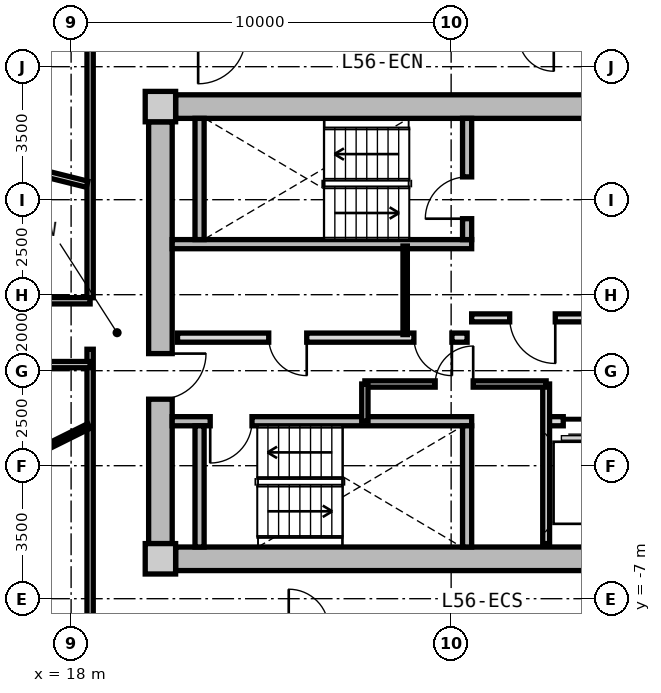
"""IFC4 building model, lengths in metres.
Left out: names, types, materials, properties, quantities, classifications, styles, units other than length and angle.
Written with IfcOpenShell. Run it as: python <this file> out.ifc"""

import sys

from ifc_helpers import new_model, si_unit, direction, frame, frame_2d, origin, origin_2d, place, context, subcontext, project, spatial, rectangle, extrude, source, transform, mapped, element, fill, save


model = new_model("IFC4")
c1 = context("Model", 3, precision=1e-05, world=origin(), true_north=direction((0.0, 1.0)))
c2 = subcontext(c1, "Body", "Model", "MODEL_VIEW")
j1 = project(units=[si_unit("LENGTHUNIT", "METRE"), si_unit("PLANEANGLEUNIT", "RADIAN")], contexts=[c1])
p1 = place(None, origin())
s1 = spatial("IfcSite", under=j1, at=p1, CompositionType="ELEMENT")
p2 = place(p1, origin())
s2 = spatial("IfcBuilding", under=s1, at=p2, CompositionType="ELEMENT")
p3 = place(p2, frame((0.0, 0.0, 180.05)))
s3 = spatial("IfcBuildingStorey", under=s2, at=p3, CompositionType="ELEMENT", Elevation=180.05)
m1 = source(origin(), c2, "Body", "SweptSolid", [
    extrude(rectangle(XDim=0.8, YDim=0.8, at=origin_2d()), origin(), (0.0, 0.0, 1.0), 3.05),
])
for number, where, z_axis, x_axis in (
    (1, (20.35, -5.95, 0.0), (0.0, 0.0, 1.0), (1.0, 0.0, 0.0)),
    (2, (20.35, 5.95, 0.0), (0.0, 0.0, 1.0), (1.0, 0.0, 0.0)),
):
    element("IfcColumn", number, at=place(p3, frame(where, z_axis=z_axis, x_axis=x_axis)), inside=s3, PredefinedType="COLUMN", context=c2, shape_type="MappedRepresentation", body=[
        mapped(m1, transform((0.0, 0.0, 0.0), x_axis=(1.0, 0.0, 0.0), y_axis=(0.0, 1.0, 0.0), z_axis=(0.0, 0.0, 1.0), scale=1.0)),
    ])
m2 = source(origin(), c2, "Body", "SweptSolid", [
    extrude(rectangle(XDim=14.5, YDim=0.62, at=frame_2d((7.25, 0.0))), origin(), (0.0, 0.0, 1.0), 2.81),
])
for number, where, z_axis, x_axis in (
    (3, (20.75, 5.95, 0.0), (0.0, 0.0, 1.0), (1.0, 0.0, 0.0)),
    (4, (35.25, -5.95, 0.0), (0.0, 0.0, 1.0), (-1.0, 0.0, 0.0)),
):
    element("IfcWall", number, at=place(p3, frame(where, z_axis=z_axis, x_axis=x_axis)), inside=s3, PredefinedType="SHEAR", context=c2, shape_type="MappedRepresentation", body=[
        mapped(m2, transform((0.0, 0.0, 0.0), x_axis=(1.0, 0.0, 0.0), y_axis=(0.0, 1.0, 0.0), z_axis=(0.0, 0.0, 1.0), scale=1.0)),
    ])
m3 = source(origin(), c2, "Body", "SweptSolid", [
    extrude(rectangle(XDim=11.1, YDim=0.62, at=frame_2d((5.55, 0.0))), origin(), (0.0, 0.0, 1.0), 2.81),
])
p4 = place(p3, frame((20.35, -5.55, 0.0), z_axis=(0.0, 0.0, 1.0), x_axis=(0.0, 1.0, 0.0)))
e5 = element("IfcWall", 5, at=p4, inside=s3, PredefinedType="SHEAR", context=c2, shape_type="MappedRepresentation", body=[
    mapped(m3, transform((0.0, 0.0, 0.0), x_axis=(1.0, 0.0, 0.0), y_axis=(0.0, 1.0, 0.0), z_axis=(0.0, 0.0, 1.0), scale=1.0)),
])
p5 = place(p4, frame((3.8, 0.0, 0.0)))
e6 = element("IfcOpeningElement", 6, at=p5, cuts=e5, PredefinedType="OPENING", context=c2, shape_type="SweptSolid", body=[
    extrude(rectangle(XDim=1.2, YDim=2.15, at=frame_2d((0.6, 1.075))), frame((0.0, 0.32, 0.0), z_axis=(0.0, -1.0, 0.0), x_axis=(1.0, 0.0, 0.0)), (0.0, 0.0, 1.0), 0.64),
])
m4 = source(origin(), c2, "Body", "SweptSolid", [
    extrude(rectangle(XDim=7.88, YDim=0.24, at=frame_2d((3.94, 0.0))), origin(), (0.0, 0.0, 1.0), 2.81),
])
p6 = place(p3, frame((20.66, 2.33, 0.0), z_axis=(0.0, 0.0, 1.0), x_axis=(1.0, 0.0, 0.0)))
e7 = element("IfcWall", 7, at=p6, inside=s3, PredefinedType="PARTITIONING", context=c2, shape_type="MappedRepresentation", body=[
    mapped(m4, transform((0.0, 0.0, 0.0), x_axis=(1.0, 0.0, 0.0), y_axis=(0.0, 1.0, 0.0), z_axis=(0.0, 0.0, 1.0), scale=1.0)),
])
m5 = source(origin(), c2, "Body", "SweptSolid", [
    extrude(rectangle(XDim=3.19, YDim=0.24, at=frame_2d((1.595, 0.0))), origin(), (0.0, 0.0, 1.0), 2.81),
])
p7 = place(p3, frame((21.38, 2.45, 0.0), z_axis=(0.0, 0.0, 1.0), x_axis=(0.0, 1.0, 0.0)))
e8 = element("IfcWall", 8, at=p7, inside=s3, PredefinedType="PARTITIONING", context=c2, shape_type="MappedRepresentation", body=[
    mapped(m5, transform((0.0, 0.0, 0.0), x_axis=(1.0, 0.0, 0.0), y_axis=(0.0, 1.0, 0.0), z_axis=(0.0, 0.0, 1.0), scale=1.0)),
])
p8 = place(p3, frame((28.42, 2.45, 0.0), z_axis=(0.0, 0.0, 1.0), x_axis=(0.0, 1.0, 0.0)))
e9 = element("IfcWall", 9, at=p8, inside=s3, PredefinedType="PARTITIONING", context=c2, shape_type="MappedRepresentation", body=[
    mapped(m5, transform((0.0, 0.0, 0.0), x_axis=(1.0, 0.0, 0.0), y_axis=(0.0, 1.0, 0.0), z_axis=(0.0, 0.0, 1.0), scale=1.0)),
])
p9 = place(p8, frame((0.55, 0.0, 0.0)))
e10 = element("IfcOpeningElement", 10, at=p9, cuts=e9, PredefinedType="OPENING", context=c2, shape_type="SweptSolid", body=[
    extrude(rectangle(XDim=1.1, YDim=2.15, at=frame_2d((0.55, 1.075))), frame((0.0, 0.13, 0.0), z_axis=(0.0, -1.0, 0.0), x_axis=(1.0, 0.0, 0.0)), (0.0, 0.0, 1.0), 0.26),
])
p10 = place(p3, frame((20.66, -2.33, 0.0), z_axis=(0.0, 0.0, 1.0), x_axis=(1.0, 0.0, 0.0)))
e11 = element("IfcWall", 11, at=p10, inside=s3, PredefinedType="PARTITIONING", context=c2, shape_type="MappedRepresentation", body=[
    mapped(m4, transform((0.0, 0.0, 0.0), x_axis=(1.0, 0.0, 0.0), y_axis=(0.0, 1.0, 0.0), z_axis=(0.0, 0.0, 1.0), scale=1.0)),
])
p11 = place(p10, frame((1.0, 0.0, 0.0)))
e12 = element("IfcOpeningElement", 12, at=p11, cuts=e11, PredefinedType="OPENING", context=c2, shape_type="SweptSolid", body=[
    extrude(rectangle(XDim=1.1, YDim=2.15, at=frame_2d((0.55, 1.075))), frame((0.0, 0.13, 0.0), z_axis=(0.0, -1.0, 0.0), x_axis=(1.0, 0.0, 0.0)), (0.0, 0.0, 1.0), 0.26),
])
for number, where, z_axis, x_axis in (
    (13, (21.38, -5.64, 0.0), (0.0, 0.0, 1.0), (0.0, 1.0, 0.0)),
    (14, (28.42, -5.64, 0.0), (0.0, 0.0, 1.0), (0.0, 1.0, 0.0)),
):
    element("IfcWall", number, at=place(p3, frame(where, z_axis=z_axis, x_axis=x_axis)), inside=s3, PredefinedType="PARTITIONING", context=c2, shape_type="MappedRepresentation", body=[
        mapped(m5, transform((0.0, 0.0, 0.0), x_axis=(1.0, 0.0, 0.0), y_axis=(0.0, 1.0, 0.0), z_axis=(0.0, 0.0, 1.0), scale=1.0)),
    ])
m6 = source(origin(), c2, "Body", "SweptSolid", [
    extrude(rectangle(XDim=6.66, YDim=0.21, at=frame_2d((3.33, 0.0))), origin(), (0.0, 0.0, 1.0), 2.795),
])
p12 = place(p3, frame((28.54, 0.39, 0.0), z_axis=(0.0, 0.0, 1.0), x_axis=(1.0, 0.0, 0.0)))
e15 = element("IfcWall", 15, at=p12, inside=s3, PredefinedType="PARTITIONING", context=c2, shape_type="MappedRepresentation", body=[
    mapped(m6, transform((0.0, 0.0, 0.0), x_axis=(1.0, 0.0, 0.0), y_axis=(0.0, 1.0, 0.0), z_axis=(0.0, 0.0, 1.0), scale=1.0)),
])
p13 = place(p12, frame((1.0, 0.0, 0.0)))
e16 = element("IfcOpeningElement", 16, at=p13, cuts=e15, PredefinedType="OPENING", context=c2, shape_type="SweptSolid", body=[
    extrude(rectangle(XDim=1.2, YDim=2.15, at=frame_2d((0.6, 1.075))), frame((0.0, 0.115, 0.0), z_axis=(0.0, -1.0, 0.0), x_axis=(1.0, 0.0, 0.0)), (0.0, 0.0, 1.0), 0.23),
])
m7 = source(origin(), c2, "Body", "SweptSolid", [
    extrude(rectangle(XDim=7.62, YDim=0.24, at=frame_2d((3.81, 0.0))), origin(), (0.0, 0.0, 1.0), 2.795),
])
p14 = place(p3, frame((20.8, -0.13, 0.0), z_axis=(0.0, 0.0, 1.0), x_axis=(1.0, 0.0, 0.0)))
e17 = element("IfcWall", 17, at=p14, inside=s3, PredefinedType="PARTITIONING", context=c2, shape_type="MappedRepresentation", body=[
    mapped(m7, transform((0.0, 0.0, 0.0), x_axis=(1.0, 0.0, 0.0), y_axis=(0.0, 1.0, 0.0), z_axis=(0.0, 0.0, 1.0), scale=1.0)),
])
p15 = place(p14, frame((6.22, 0.0, 0.0)))
e18 = element("IfcOpeningElement", 18, at=p15, cuts=e17, PredefinedType="OPENING", context=c2, shape_type="SweptSolid", body=[
    extrude(rectangle(XDim=1.0, YDim=2.1, at=frame_2d((0.5, 1.05))), frame((0.0, 0.13, 0.0), z_axis=(0.0, -1.0, 0.0), x_axis=(1.0, 0.0, 0.0)), (0.0, 0.0, 1.0), 0.26),
])
p16 = place(p14, frame((2.4, 0.0, 0.0)))
e19 = element("IfcOpeningElement", 19, at=p16, cuts=e17, PredefinedType="OPENING", context=c2, shape_type="SweptSolid", body=[
    extrude(rectangle(XDim=1.0, YDim=2.1, at=frame_2d((0.5, 1.05))), frame((0.0, 0.13, 0.0), z_axis=(0.0, -1.0, 0.0), x_axis=(1.0, 0.0, 0.0)), (0.0, 0.0, 1.0), 0.26),
])
m8 = source(origin(), c2, "Body", "SweptSolid", [
    extrude(rectangle(XDim=2.33, YDim=0.115, at=frame_2d((1.165, 0.0))), origin(), (0.0, 0.0, 1.0), 2.795),
])
p17 = place(p3, frame((26.79, -0.05, 0.0), z_axis=(0.0, 0.0, 1.0), x_axis=(0.0, 1.0, 0.0)))
e20 = element("IfcWall", 20, at=p17, inside=s3, PredefinedType="PARTITIONING", context=c2, shape_type="MappedRepresentation", body=[
    mapped(m8, transform((0.0, 0.0, 0.0), x_axis=(1.0, 0.0, 0.0), y_axis=(0.0, 1.0, 0.0), z_axis=(0.0, 0.0, 1.0), scale=1.0)),
])
m9 = source(origin(), c2, "Body", "SweptSolid", [
    extrude(rectangle(XDim=2.05, YDim=0.24, at=frame_2d((1.025, 0.0))), origin(), (0.0, 0.0, 1.0), 2.795),
])
p18 = place(p3, frame((30.5, -2.33, 0.0), z_axis=(0.0, 0.0, 1.0), x_axis=(1.0, 0.0, 0.0)))
e21 = element("IfcWall", 21, at=p18, inside=s3, PredefinedType="PARTITIONING", context=c2, shape_type="MappedRepresentation", body=[
    mapped(m9, transform((0.0, 0.0, 0.0), x_axis=(1.0, 0.0, 0.0), y_axis=(0.0, 1.0, 0.0), z_axis=(0.0, 0.0, 1.0), scale=1.0)),
])
p19 = place(p18, frame((0.45, 0.0, 0.0)))
e22 = element("IfcOpeningElement", 22, at=p19, cuts=e21, PredefinedType="OPENING", context=c2, shape_type="SweptSolid", body=[
    extrude(rectangle(XDim=1.1, YDim=2.2, at=frame_2d((0.55, 1.1))), frame((0.0, 0.13, 0.0), z_axis=(0.0, -1.0, 0.0), x_axis=(1.0, 0.0, 0.0)), (0.0, 0.0, 1.0), 0.26),
])
m10 = source(origin(), c2, "Body", "SweptSolid", [
    extrude(rectangle(XDim=4.2, YDim=0.18, at=frame_2d((2.1, 0.0))), origin(), (0.0, 0.0, 1.0), 2.795),
])
p20 = place(p3, frame((30.5, -5.55, 0.0), z_axis=(0.0, 0.0, 1.0), x_axis=(0.0, 1.0, 0.0)))
e23 = element("IfcWall", 23, at=p20, inside=s3, PredefinedType="PARTITIONING", context=c2, shape_type="MappedRepresentation", body=[
    mapped(m10, transform((0.0, 0.0, 0.0), x_axis=(1.0, 0.0, 0.0), y_axis=(0.0, 1.0, 0.0), z_axis=(0.0, 0.0, 1.0), scale=1.0)),
])
m11 = source(origin(), c2, "Body", "SweptSolid", [
    extrude(rectangle(XDim=4.77, YDim=0.165, at=frame_2d((2.385, 0.0))), origin(), (0.0, 0.0, 1.0), 2.795),
])
p21 = place(p3, frame((25.73, -1.35, 0.0), z_axis=(0.0, 0.0, 1.0), x_axis=(1.0, 0.0, 0.0)))
e24 = element("IfcWall", 24, at=p21, inside=s3, PredefinedType="PARTITIONING", context=c2, shape_type="MappedRepresentation", body=[
    mapped(m11, transform((0.0, 0.0, 0.0), x_axis=(1.0, 0.0, 0.0), y_axis=(0.0, 1.0, 0.0), z_axis=(0.0, 0.0, 1.0), scale=1.0)),
])
p22 = place(p21, frame((1.85, 0.0, 0.0)))
e25 = element("IfcOpeningElement", 25, at=p22, cuts=e24, PredefinedType="OPENING", context=c2, shape_type="SweptSolid", body=[
    extrude(rectangle(XDim=1.0, YDim=2.1, at=frame_2d((0.5, 1.05))), frame((0.0, 0.093, 0.0), z_axis=(0.0, -1.0, 0.0), x_axis=(1.0, 0.0, 0.0)), (0.0, 0.0, 1.0), 0.185),
])
m12 = source(origin(), c2, "Body", "SweptSolid", [
    extrude(rectangle(XDim=0.98, YDim=0.165, at=frame_2d((0.49, 0.0))), origin(), (0.0, 0.0, 1.0), 2.795),
])
p23 = place(p3, frame((25.73, -2.33, 0.0), z_axis=(0.0, 0.0, 1.0), x_axis=(0.0, 1.0, 0.0)))
e26 = element("IfcWall", 26, at=p23, inside=s3, PredefinedType="PARTITIONING", context=c2, shape_type="MappedRepresentation", body=[
    mapped(m12, transform((0.0, 0.0, 0.0), x_axis=(1.0, 0.0, 0.0), y_axis=(0.0, 1.0, 0.0), z_axis=(0.0, 0.0, 1.0), scale=1.0)),
])
m13 = source(origin(), c2, "Body", "SweptSolid", [
    extrude(rectangle(XDim=7.365, YDim=0.165, at=frame_2d((3.682, 0.0))), origin(), (0.0, 0.0, 1.0), 2.795),
])
p24 = place(p3, frame((18.5, -7.8, 0.0), z_axis=(0.0, 0.0, 1.0), x_axis=(0.0, 1.0, 0.0)))
e27 = element("IfcWall", 27, at=p24, inside=s3, PredefinedType="PARTITIONING", context=c2, shape_type="MappedRepresentation", body=[
    mapped(m13, transform((0.0, 0.0, 0.0), x_axis=(1.0, 0.0, 0.0), y_axis=(0.0, 1.0, 0.0), z_axis=(0.0, 0.0, 1.0), scale=1.0)),
])
m14 = source(origin(), c2, "Body", "SweptSolid", [
    extrude(rectangle(XDim=6.88, YDim=0.165, at=frame_2d((3.44, 0.0))), origin(), (0.0, 0.0, 1.0), 2.795),
])
p25 = place(p3, frame((18.5, 0.92, 0.0), z_axis=(0.0, 0.0, 1.0), x_axis=(0.0, 1.0, 0.0)))
e28 = element("IfcWall", 28, at=p25, inside=s3, PredefinedType="PARTITIONING", context=c2, shape_type="MappedRepresentation", body=[
    mapped(m14, transform((0.0, 0.0, 0.0), x_axis=(1.0, 0.0, 0.0), y_axis=(0.0, 1.0, 0.0), z_axis=(0.0, 0.0, 1.0), scale=1.0)),
])
m15 = source(origin(), c2, "Body", "SweptSolid", [
    extrude(rectangle(XDim=8.305, YDim=0.165, at=frame_2d((4.153, 0.0))), origin(), (0.0, 0.0, 1.0), 2.345),
])
p26 = place(p3, frame((18.42, 3.908, 0.0), z_axis=(0.0, 0.0, 1.0), x_axis=(-0.970309994378, 0.241864662175, 0.0)))
e29 = element("IfcWall", 29, at=p26, inside=s3, PredefinedType="PARTITIONING", context=c2, shape_type="MappedRepresentation", body=[
    mapped(m15, transform((0.0, 0.0, 0.0), x_axis=(1.0, 0.0, 0.0), y_axis=(0.0, 1.0, 0.0), z_axis=(0.0, 0.0, 1.0), scale=1.0)),
])
m16 = source(origin(), c2, "Body", "SweptSolid", [
    extrude(rectangle(XDim=8.189, YDim=0.165, at=frame_2d((4.094, 0.0))), origin(), (0.0, 0.0, 1.0), 2.795),
])
p27 = place(p3, frame((10.311, 0.84, 0.0), z_axis=(0.0, 0.0, 1.0), x_axis=(1.0, 0.0, 0.0)))
e30 = element("IfcWall", 30, at=p27, inside=s3, PredefinedType="PARTITIONING", context=c2, shape_type="MappedRepresentation", body=[
    mapped(m16, transform((0.0, 0.0, 0.0), x_axis=(1.0, 0.0, 0.0), y_axis=(0.0, 1.0, 0.0), z_axis=(0.0, 0.0, 1.0), scale=1.0)),
])
p28 = place(p27, frame((3.619, 0.0, 0.0)))
e31 = element("IfcOpeningElement", 31, at=p28, cuts=e30, PredefinedType="OPENING", context=c2, shape_type="SweptSolid", body=[
    extrude(rectangle(XDim=0.95, YDim=2.1, at=frame_2d((0.475, 1.05))), frame((0.0, 0.093, 0.0), z_axis=(0.0, -1.0, 0.0), x_axis=(1.0, 0.0, 0.0)), (0.0, 0.0, 1.0), 0.185),
])
p29 = place(p3, frame((18.5, -0.84, 0.0), z_axis=(0.0, 0.0, 1.0), x_axis=(-1.0, 0.0, 0.0)))
e32 = element("IfcWall", 32, at=p29, inside=s3, PredefinedType="PARTITIONING", context=c2, shape_type="MappedRepresentation", body=[
    mapped(m16, transform((0.0, 0.0, 0.0), x_axis=(1.0, 0.0, 0.0), y_axis=(0.0, 1.0, 0.0), z_axis=(0.0, 0.0, 1.0), scale=1.0)),
])
m17 = source(origin(), c2, "Body", "SweptSolid", [
    extrude(rectangle(XDim=2.403, YDim=0.14, at=frame_2d((1.201, 0.0))), origin(), (0.0, 0.0, 1.0), 2.795),
])
p30 = place(p3, frame((18.47, -2.456, 0.0), z_axis=(0.0, 0.0, 1.0), x_axis=(-0.895339866084, -0.445383569748, 0.0)))
e33 = element("IfcWall", 33, at=p30, inside=s3, PredefinedType="PARTITIONING", context=c2, shape_type="MappedRepresentation", body=[
    mapped(m17, transform((0.0, 0.0, 0.0), x_axis=(1.0, 0.0, 0.0), y_axis=(0.0, 1.0, 0.0), z_axis=(0.0, 0.0, 1.0), scale=1.0)),
])
m18 = source(origin(), c2, "Body", "SweptSolid", [
    extrude(rectangle(XDim=1.1, YDim=2.15, at=frame_2d((0.55, 1.075))), frame((0.0, 0.025, 0.0), z_axis=(0.0, -1.0, 0.0), x_axis=(1.0, 0.0, 0.0)), (0.0, 0.0, 1.0), 0.05),
])
p31 = place(p9, origin())
e34 = element("IfcDoor", 34, at=p31, inside=s3, OperationType="SINGLE_SWING_LEFT", PredefinedType="DOOR", context=c2, shape_type="MappedRepresentation", body=[
    mapped(m18, transform((0.0, 0.0, 0.0), x_axis=(1.0, 0.0, 0.0), y_axis=(0.0, 1.0, 0.0), z_axis=(0.0, 0.0, 1.0), scale=1.0)),
])
fill(e10, e34)
p32 = place(p11, frame((1.1, 0.0, 0.0), z_axis=(0.0, 0.0, 1.0), x_axis=(-1.0, 0.0, 0.0)))
e35 = element("IfcDoor", 35, at=p32, inside=s3, OperationType="SINGLE_SWING_RIGHT", PredefinedType="DOOR", context=c2, shape_type="MappedRepresentation", body=[
    mapped(m18, transform((0.0, 0.0, 0.0), x_axis=(1.0, 0.0, 0.0), y_axis=(0.0, 1.0, 0.0), z_axis=(0.0, 0.0, 1.0), scale=1.0)),
])
fill(e12, e35)
m19 = source(origin(), c2, "Body", "SweptSolid", [
    extrude(rectangle(XDim=1.2, YDim=2.15, at=frame_2d((0.6, 1.075))), frame((0.0, 0.025, 0.0), z_axis=(0.0, -1.0, 0.0), x_axis=(1.0, 0.0, 0.0)), (0.0, 0.0, 1.0), 0.05),
])
p33 = place(p13, frame((1.2, 0.0, 0.0), z_axis=(0.0, 0.0, 1.0), x_axis=(-1.0, 0.0, 0.0)))
e36 = element("IfcDoor", 36, at=p33, inside=s3, OperationType="SINGLE_SWING_LEFT", PredefinedType="DOOR", context=c2, shape_type="MappedRepresentation", body=[
    mapped(m19, transform((0.0, 0.0, 0.0), x_axis=(1.0, 0.0, 0.0), y_axis=(0.0, 1.0, 0.0), z_axis=(0.0, 0.0, 1.0), scale=1.0)),
])
fill(e16, e36)
p34 = place(p5, frame((1.2, 0.0, 0.0), z_axis=(0.0, 0.0, 1.0), x_axis=(-1.0, 0.0, 0.0)))
e37 = element("IfcDoor", 37, at=p34, inside=s3, OperationType="SINGLE_SWING_LEFT", PredefinedType="DOOR", context=c2, shape_type="MappedRepresentation", body=[
    mapped(m19, transform((0.0, 0.0, 0.0), x_axis=(1.0, 0.0, 0.0), y_axis=(0.0, 1.0, 0.0), z_axis=(0.0, 0.0, 1.0), scale=1.0)),
])
fill(e6, e37)
m20 = source(origin(), c2, "Body", "SweptSolid", [
    extrude(rectangle(XDim=1.0, YDim=2.1, at=frame_2d((0.5, 1.05))), frame((0.0, 0.025, 0.0), z_axis=(0.0, -1.0, 0.0), x_axis=(1.0, 0.0, 0.0)), (0.0, 0.0, 1.0), 0.05),
])
p35 = place(p15, frame((1.0, 0.0, 0.0), z_axis=(0.0, 0.0, 1.0), x_axis=(-1.0, 0.0, 0.0)))
e38 = element("IfcDoor", 38, at=p35, inside=s3, OperationType="SINGLE_SWING_LEFT", PredefinedType="DOOR", context=c2, shape_type="MappedRepresentation", body=[
    mapped(m20, transform((0.0, 0.0, 0.0), x_axis=(1.0, 0.0, 0.0), y_axis=(0.0, 1.0, 0.0), z_axis=(0.0, 0.0, 1.0), scale=1.0)),
])
fill(e18, e38)
p36 = place(p16, frame((1.0, 0.0, 0.0), z_axis=(0.0, 0.0, 1.0), x_axis=(-1.0, 0.0, 0.0)))
e39 = element("IfcDoor", 39, at=p36, inside=s3, OperationType="SINGLE_SWING_LEFT", PredefinedType="DOOR", context=c2, shape_type="MappedRepresentation", body=[
    mapped(m20, transform((0.0, 0.0, 0.0), x_axis=(1.0, 0.0, 0.0), y_axis=(0.0, 1.0, 0.0), z_axis=(0.0, 0.0, 1.0), scale=1.0)),
])
fill(e19, e39)
m21 = source(origin(), c2, "Body", "SweptSolid", [
    extrude(rectangle(XDim=1.1, YDim=2.2, at=frame_2d((0.55, 1.1))), frame((0.0, 0.025, 0.0), z_axis=(0.0, -1.0, 0.0), x_axis=(1.0, 0.0, 0.0)), (0.0, 0.0, 1.0), 0.05),
])
p37 = place(p19, frame((1.1, 0.0, 0.0), z_axis=(0.0, 0.0, 1.0), x_axis=(-1.0, 0.0, 0.0)))
e40 = element("IfcDoor", 40, at=p37, inside=s3, OperationType="SLIDING_TO_RIGHT", PredefinedType="DOOR", context=c2, shape_type="MappedRepresentation", body=[
    mapped(m21, transform((0.0, 0.0, 0.0), x_axis=(1.0, 0.0, 0.0), y_axis=(0.0, 1.0, 0.0), z_axis=(0.0, 0.0, 1.0), scale=1.0)),
])
fill(e22, e40)
p38 = place(p22, origin())
e41 = element("IfcDoor", 41, at=p38, inside=s3, OperationType="SINGLE_SWING_RIGHT", PredefinedType="DOOR", context=c2, shape_type="MappedRepresentation", body=[
    mapped(m20, transform((0.0, 0.0, 0.0), x_axis=(1.0, 0.0, 0.0), y_axis=(0.0, 1.0, 0.0), z_axis=(0.0, 0.0, 1.0), scale=1.0)),
])
fill(e25, e41)
save(model, sys.argv[1])
